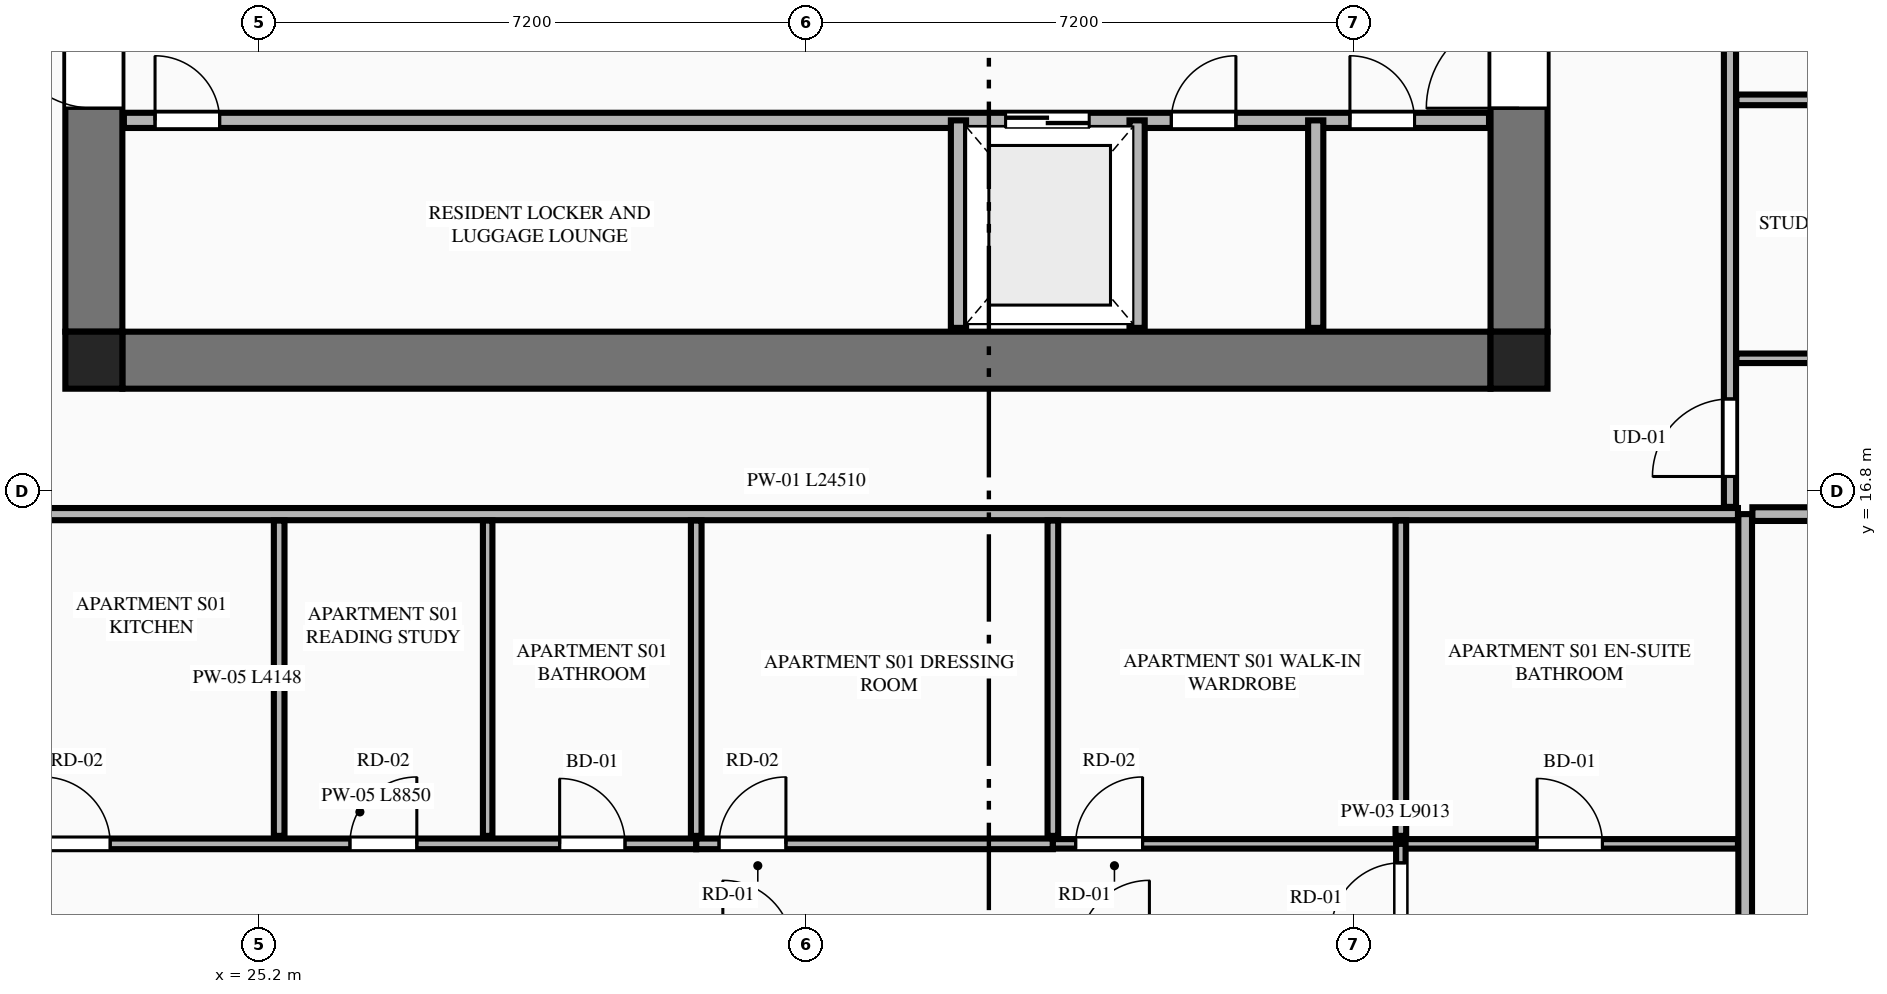
"""IFC4 building model, lengths in metres.
Left out: names, types, materials, properties, quantities, classifications, styles, units other than length and angle.
Written with IfcOpenShell. Run it as: python <this file> out.ifc"""

import sys

from ifc_helpers import new_model, si_unit, direction, frame, frame_2d, origin, origin_2d, place, context, subcontext, project, spatial, rectangle, extrude, element, fill, save


model = new_model("IFC4")
c1 = context("Model", 3, precision=1e-05, world=origin(), true_north=direction((0.0, 1.0)))
c2 = subcontext(c1, "Body", "Model", "MODEL_VIEW")
j1 = project(units=[si_unit("LENGTHUNIT", "METRE"), si_unit("PLANEANGLEUNIT", "RADIAN")], contexts=[c1])
p1 = place(None, origin())
s1 = spatial("IfcSite", under=j1, at=p1, CompositionType="ELEMENT")
p2 = place(p1, origin())
s2 = spatial("IfcBuilding", under=s1, at=p2, CompositionType="ELEMENT")
p3 = place(p2, frame((0.0, 0.0, 144.55)))
s3 = spatial("IfcBuildingStorey", under=s2, at=p3, CompositionType="ELEMENT", Elevation=144.55)
for number, where, z_axis, x_axis in (
    (1, (23.025, 18.525, 0.0), (0.0, 0.0, 1.0), (1.0, 0.0, 0.0)),
    (2, (41.775, 18.525, 0.0), (0.0, 0.0, 1.0), (1.0, 0.0, 0.0)),
):
    element("IfcColumn", number, at=place(p3, frame(where, z_axis=z_axis, x_axis=x_axis)), inside=s3, PredefinedType="COLUMN", context=c2, shape_type="SweptSolid", body=[
        extrude(rectangle(XDim=0.75, YDim=0.75, at=origin_2d()), origin(), (0.0, 0.0, 1.0), 3.55),
    ])
p4 = place(p3, frame((23.4, 18.525, 0.0), z_axis=(0.0, 0.0, 1.0), x_axis=(1.0, 0.0, 0.0)))
e3 = element("IfcWall", 3, at=p4, inside=s3, PredefinedType="SHEAR", context=c2, shape_type="SweptSolid", body=[
    extrude(rectangle(XDim=18.0, YDim=0.75, at=frame_2d((9.0, 0.0))), origin(), (0.0, 0.0, 1.0), 3.27),
])
p5 = place(p3, frame((23.025, 18.9, 0.0), z_axis=(0.0, 0.0, 1.0), x_axis=(0.0, 1.0, 0.0)))
e4 = element("IfcWall", 4, at=p5, inside=s3, PredefinedType="SHEAR", context=c2, shape_type="SweptSolid", body=[
    extrude(rectangle(XDim=14.0, YDim=0.75, at=frame_2d((7.0, 0.0))), origin(), (0.0, 0.0, 1.0), 3.27),
])
p6 = place(p5, frame((2.94, 0.0, 0.0)))
e5 = element("IfcOpeningElement", 5, at=p6, cuts=e4, PredefinedType="OPENING", context=c2, shape_type="SweptSolid", body=[
    extrude(rectangle(XDim=1.22, YDim=2.25, at=frame_2d((0.61, 1.125))), frame((0.0, 0.385, 0.0), z_axis=(0.0, -1.0, 0.0), x_axis=(1.0, 0.0, 0.0)), (0.0, 0.0, 1.0), 0.77),
])
p7 = place(p3, frame((41.775, 18.9, 0.0), z_axis=(0.0, 0.0, 1.0), x_axis=(0.0, 1.0, 0.0)))
e6 = element("IfcWall", 6, at=p7, inside=s3, PredefinedType="SHEAR", context=c2, shape_type="SweptSolid", body=[
    extrude(rectangle(XDim=14.0, YDim=0.75, at=frame_2d((7.0, 0.0))), origin(), (0.0, 0.0, 1.0), 3.27),
])
p8 = place(p7, frame((2.94, 0.0, 0.0)))
e7 = element("IfcOpeningElement", 7, at=p8, cuts=e6, PredefinedType="OPENING", context=c2, shape_type="SweptSolid", body=[
    extrude(rectangle(XDim=1.22, YDim=2.25, at=frame_2d((0.61, 1.125))), frame((0.0, 0.385, 0.0), z_axis=(0.0, -1.0, 0.0), x_axis=(1.0, 0.0, 0.0)), (0.0, 0.0, 1.0), 0.77),
])
p9 = place(p3, frame((23.42, 21.68, 0.0), z_axis=(0.0, 0.0, 1.0), x_axis=(1.0, 0.0, 0.0)))
e8 = element("IfcWall", 8, at=p9, inside=s3, PredefinedType="PLUMBINGWALL", context=c2, shape_type="SweptSolid", body=[
    extrude(rectangle(XDim=17.96, YDim=0.2, at=frame_2d((8.98, 0.0))), origin(), (0.0, 0.0, 1.0), 3.27),
])
p10 = place(p9, frame((11.6, 0.0, 0.0)))
e9 = element("IfcOpeningElement", 9, at=p10, cuts=e8, PredefinedType="OPENING", context=c2, shape_type="SweptSolid", body=[
    extrude(rectangle(XDim=1.1, YDim=2.2, at=frame_2d((0.55, 1.1))), frame((0.0, 0.11, 0.0), z_axis=(0.0, -1.0, 0.0), x_axis=(1.0, 0.0, 0.0)), (0.0, 0.0, 1.0), 0.22),
])
p11 = place(p9, frame((0.41, 0.0, 0.0)))
e10 = element("IfcOpeningElement", 10, at=p11, cuts=e8, PredefinedType="OPENING", context=c2, shape_type="SweptSolid", body=[
    extrude(rectangle(XDim=0.85, YDim=2.05, at=frame_2d((0.425, 1.025))), frame((0.0, 0.11, 0.0), z_axis=(0.0, -1.0, 0.0), x_axis=(1.0, 0.0, 0.0)), (0.0, 0.0, 1.0), 0.22),
])
p12 = place(p9, frame((13.78, 0.0, 0.0)))
e11 = element("IfcOpeningElement", 11, at=p12, cuts=e8, PredefinedType="OPENING", context=c2, shape_type="SweptSolid", body=[
    extrude(rectangle(XDim=0.85, YDim=2.05, at=frame_2d((0.425, 1.025))), frame((0.0, 0.11, 0.0), z_axis=(0.0, -1.0, 0.0), x_axis=(1.0, 0.0, 0.0)), (0.0, 0.0, 1.0), 0.22),
])
p13 = place(p9, frame((16.13, 0.0, 0.0)))
e12 = element("IfcOpeningElement", 12, at=p13, cuts=e8, PredefinedType="OPENING", context=c2, shape_type="SweptSolid", body=[
    extrude(rectangle(XDim=0.85, YDim=2.05, at=frame_2d((0.425, 1.025))), frame((0.0, 0.11, 0.0), z_axis=(0.0, -1.0, 0.0), x_axis=(1.0, 0.0, 0.0)), (0.0, 0.0, 1.0), 0.22),
])
for number, where, z_axis, x_axis in (
    (13, (34.4, 18.95, 0.0), (0.0, 0.0, 1.0), (0.0, 1.0, 0.0)),
    (14, (36.75, 18.95, 0.0), (0.0, 0.0, 1.0), (0.0, 1.0, 0.0)),
    (15, (39.1, 18.95, 0.0), (0.0, 0.0, 1.0), (0.0, 1.0, 0.0)),
):
    element("IfcWall", number, at=place(p3, frame(where, z_axis=z_axis, x_axis=x_axis)), inside=s3, PredefinedType="PLUMBINGWALL", context=c2, shape_type="SweptSolid", body=[
        extrude(rectangle(XDim=2.73, YDim=0.2, at=frame_2d((1.365, 0.0))), origin(), (0.0, 0.0, 1.0), 3.27),
    ])
p14 = place(p3, frame((44.75, 4.105, 0.0), z_axis=(0.0, 0.0, 1.0), x_axis=(0.0, 1.0, 0.0)))
e16 = element("IfcWall", 16, at=p14, inside=s3, PredefinedType="PARTITIONING", context=c2, shape_type="SweptSolid", body=[
    extrude(rectangle(XDim=12.395, YDim=0.18, at=frame_2d((6.198, 0.0))), origin(), (0.0, 0.0, 1.0), 3.27),
])
p15 = place(p3, frame((20.145, 16.5, 0.0), z_axis=(0.0, 0.0, 1.0), x_axis=(1.0, 0.0, 0.0)))
e17 = element("IfcWall", 17, at=p15, inside=s3, PredefinedType="PARTITIONING", context=c2, shape_type="SweptSolid", body=[
    extrude(rectangle(XDim=24.51, YDim=0.16, at=frame_2d((12.255, 0.0))), origin(), (0.0, 0.0, 1.0), 3.27),
])
p16 = place(p15, frame((0.405, 0.0, 0.0)))
e18 = element("IfcOpeningElement", 18, at=p16, cuts=e17, PredefinedType="OPENING", context=c2, shape_type="SweptSolid", body=[
    extrude(rectangle(XDim=1.35, YDim=2.35, at=frame_2d((0.675, 1.175))), frame((0.0, 0.09, 0.0), z_axis=(0.0, -1.0, 0.0), x_axis=(1.0, 0.0, 0.0)), (0.0, 0.0, 1.0), 0.18),
])
p17 = place(p3, frame((22.1, 12.162, 0.0), z_axis=(0.0, 0.0, 1.0), x_axis=(1.0, 0.0, 0.0)))
e19 = element("IfcWall", 19, at=p17, inside=s3, PredefinedType="PLUMBINGWALL", context=c2, shape_type="SweptSolid", body=[
    extrude(rectangle(XDim=8.85, YDim=0.14, at=frame_2d((4.425, 0.0))), origin(), (0.0, 0.0, 1.0), 3.27),
])
p18 = place(p17, frame((7.053, 0.0, 0.0)))
e20 = element("IfcOpeningElement", 20, at=p18, cuts=e19, PredefinedType="OPENING", context=c2, shape_type="SweptSolid", body=[
    extrude(rectangle(XDim=0.86, YDim=2.1, at=frame_2d((0.43, 1.05))), frame((0.0, 0.08, 0.0), z_axis=(0.0, -1.0, 0.0), x_axis=(1.0, 0.0, 0.0)), (0.0, 0.0, 1.0), 0.16),
])
p19 = place(p17, frame((0.26, 0.0, 0.0)))
e21 = element("IfcOpeningElement", 21, at=p19, cuts=e19, PredefinedType="OPENING", context=c2, shape_type="SweptSolid", body=[
    extrude(rectangle(XDim=0.88, YDim=2.15, at=frame_2d((0.44, 1.075))), frame((0.0, 0.08, 0.0), z_axis=(0.0, -1.0, 0.0), x_axis=(1.0, 0.0, 0.0)), (0.0, 0.0, 1.0), 0.16),
])
p20 = place(p17, frame((4.294, 0.0, 0.0)))
e22 = element("IfcOpeningElement", 22, at=p20, cuts=e19, PredefinedType="OPENING", context=c2, shape_type="SweptSolid", body=[
    extrude(rectangle(XDim=0.88, YDim=2.15, at=frame_2d((0.44, 1.075))), frame((0.0, 0.08, 0.0), z_axis=(0.0, -1.0, 0.0), x_axis=(1.0, 0.0, 0.0)), (0.0, 0.0, 1.0), 0.16),
])
p21 = place(p3, frame((30.95, 12.162, 0.0), z_axis=(0.0, 0.0, 1.0), x_axis=(1.0, 0.0, 0.0)))
e23 = element("IfcWall", 23, at=p21, inside=s3, PredefinedType="PLUMBINGWALL", context=c2, shape_type="SweptSolid", body=[
    extrude(rectangle(XDim=4.692, YDim=0.14, at=frame_2d((2.346, 0.0))), origin(), (0.0, 0.0, 1.0), 3.27),
])
p22 = place(p21, frame((0.3, 0.0, 0.0)))
e24 = element("IfcOpeningElement", 24, at=p22, cuts=e23, PredefinedType="OPENING", context=c2, shape_type="SweptSolid", body=[
    extrude(rectangle(XDim=0.88, YDim=2.15, at=frame_2d((0.44, 1.075))), frame((0.0, 0.08, 0.0), z_axis=(0.0, -1.0, 0.0), x_axis=(1.0, 0.0, 0.0)), (0.0, 0.0, 1.0), 0.16),
])
p23 = place(p3, frame((35.642, 12.162, 0.0), z_axis=(0.0, 0.0, 1.0), x_axis=(1.0, 0.0, 0.0)))
e25 = element("IfcWall", 25, at=p23, inside=s3, PredefinedType="PARTITIONING", context=c2, shape_type="SweptSolid", body=[
    extrude(rectangle(XDim=9.013, YDim=0.125, at=frame_2d((4.506, 0.0))), origin(), (0.0, 0.0, 1.0), 3.27),
])
p24 = place(p23, frame((6.37, 0.0, 0.0)))
e26 = element("IfcOpeningElement", 26, at=p24, cuts=e25, PredefinedType="OPENING", context=c2, shape_type="SweptSolid", body=[
    extrude(rectangle(XDim=0.86, YDim=2.1, at=frame_2d((0.43, 1.05))), frame((0.0, 0.073, 0.0), z_axis=(0.0, -1.0, 0.0), x_axis=(1.0, 0.0, 0.0)), (0.0, 0.0, 1.0), 0.145),
])
p25 = place(p23, frame((0.3, 0.0, 0.0)))
e27 = element("IfcOpeningElement", 27, at=p25, cuts=e25, PredefinedType="OPENING", context=c2, shape_type="SweptSolid", body=[
    extrude(rectangle(XDim=0.88, YDim=2.15, at=frame_2d((0.44, 1.075))), frame((0.0, 0.073, 0.0), z_axis=(0.0, -1.0, 0.0), x_axis=(1.0, 0.0, 0.0)), (0.0, 0.0, 1.0), 0.145),
])
p26 = place(p3, frame((25.463, 12.267, 0.0), z_axis=(0.0, 0.0, 1.0), x_axis=(0.0, 1.0, 0.0)))
e28 = element("IfcWall", 28, at=p26, inside=s3, PredefinedType="PLUMBINGWALL", context=c2, shape_type="SweptSolid", body=[
    extrude(rectangle(XDim=4.148, YDim=0.14, at=frame_2d((2.074, 0.0))), origin(), (0.0, 0.0, 1.0), 3.27),
])
p27 = place(p3, frame((28.206, 12.267, 0.0), z_axis=(0.0, 0.0, 1.0), x_axis=(0.0, 1.0, 0.0)))
e29 = element("IfcWall", 29, at=p27, inside=s3, PredefinedType="PARTITIONING", context=c2, shape_type="SweptSolid", body=[
    extrude(rectangle(XDim=4.148, YDim=0.125, at=frame_2d((2.074, 0.0))), origin(), (0.0, 0.0, 1.0), 3.27),
])
p28 = place(p3, frame((40.22, 10.832, 0.0), z_axis=(0.0, 0.0, 1.0), x_axis=(0.0, 1.0, 0.0)))
e30 = element("IfcWall", 30, at=p28, inside=s3, PredefinedType="PARTITIONING", context=c2, shape_type="SweptSolid", body=[
    extrude(rectangle(XDim=1.33, YDim=0.125, at=frame_2d((0.665, 0.0))), origin(), (0.0, 0.0, 1.0), 3.27),
])
p29 = place(p28, frame((0.16, 0.0, 0.0)))
e31 = element("IfcOpeningElement", 31, at=p29, cuts=e30, PredefinedType="OPENING", context=c2, shape_type="SweptSolid", body=[
    extrude(rectangle(XDim=0.92, YDim=2.15, at=frame_2d((0.46, 1.075))), frame((0.0, 0.073, 0.0), z_axis=(0.0, -1.0, 0.0), x_axis=(1.0, 0.0, 0.0)), (0.0, 0.0, 1.0), 0.145),
])
for number, where, z_axis, x_axis in (
    (32, (30.95, 12.267, 0.0), (0.0, 0.0, 1.0), (0.0, 1.0, 0.0)),
    (33, (35.642, 12.267, 0.0), (0.0, 0.0, 1.0), (0.0, 1.0, 0.0)),
    (34, (40.22, 12.267, 0.0), (0.0, 0.0, 1.0), (0.0, 1.0, 0.0)),
):
    element("IfcWall", number, at=place(p3, frame(where, z_axis=z_axis, x_axis=x_axis)), inside=s3, PredefinedType="PLUMBINGWALL", context=c2, shape_type="SweptSolid", body=[
        extrude(rectangle(XDim=4.148, YDim=0.14, at=frame_2d((2.074, 0.0))), origin(), (0.0, 0.0, 1.0), 3.27),
    ])
p30 = place(p3, frame((44.845, 16.5, 0.0), z_axis=(0.0, 0.0, 1.0), x_axis=(1.0, 0.0, 0.0)))
e35 = element("IfcWall", 35, at=p30, inside=s3, PredefinedType="PARTITIONING", context=c2, shape_type="SweptSolid", body=[
    extrude(rectangle(XDim=7.77, YDim=0.18, at=frame_2d((3.885, 0.0))), origin(), (0.0, 0.0, 1.0), 3.27),
])
p31 = place(p3, frame((44.55, 16.595, 0.0), z_axis=(0.0, 0.0, 1.0), x_axis=(0.0, 1.0, 0.0)))
e36 = element("IfcWall", 36, at=p31, inside=s3, PredefinedType="PARTITIONING", context=c2, shape_type="SweptSolid", body=[
    extrude(rectangle(XDim=10.714, YDim=0.16, at=frame_2d((5.357, 0.0))), origin(), (0.0, 0.0, 1.0), 3.27),
])
p32 = place(p31, frame((0.4, 0.0, 0.0)))
e37 = element("IfcOpeningElement", 37, at=p32, cuts=e36, PredefinedType="OPENING", context=c2, shape_type="SweptSolid", body=[
    extrude(rectangle(XDim=1.02, YDim=2.25, at=frame_2d((0.51, 1.125))), frame((0.0, 0.09, 0.0), z_axis=(0.0, -1.0, 0.0), x_axis=(1.0, 0.0, 0.0)), (0.0, 0.0, 1.0), 0.18),
])
p33 = place(p3, frame((44.635, 18.55, 0.0), z_axis=(0.0, 0.0, 1.0), x_axis=(1.0, 0.0, 0.0)))
e38 = element("IfcWall", 38, at=p33, inside=s3, PredefinedType="PARTITIONING", context=c2, shape_type="SweptSolid", body=[
    extrude(rectangle(XDim=3.48, YDim=0.125, at=frame_2d((1.74, 0.0))), origin(), (0.0, 0.0, 1.0), 2.652),
])
p34 = place(p3, frame((44.635, 21.95, 0.0), z_axis=(0.0, 0.0, 1.0), x_axis=(1.0, 0.0, 0.0)))
e39 = element("IfcWall", 39, at=p34, inside=s3, PredefinedType="PLUMBINGWALL", context=c2, shape_type="SweptSolid", body=[
    extrude(rectangle(XDim=3.48, YDim=0.14, at=frame_2d((1.74, 0.0))), origin(), (0.0, 0.0, 1.0), 3.27),
])
p35 = place(p6, origin())
e40 = element("IfcDoor", 40, at=p35, inside=s3, OperationType="SINGLE_SWING_RIGHT", PredefinedType="DOOR", context=c2, shape_type="SweptSolid", body=[
    extrude(rectangle(XDim=1.22, YDim=2.25, at=frame_2d((0.61, 1.125))), frame((0.0, 0.025, 0.0), z_axis=(0.0, -1.0, 0.0), x_axis=(1.0, 0.0, 0.0)), (0.0, 0.0, 1.0), 0.05),
])
fill(e5, e40)
p36 = place(p8, origin())
e41 = element("IfcDoor", 41, at=p36, inside=s3, OperationType="SINGLE_SWING_LEFT", PredefinedType="DOOR", context=c2, shape_type="SweptSolid", body=[
    extrude(rectangle(XDim=1.22, YDim=2.25, at=frame_2d((0.61, 1.125))), frame((0.0, 0.025, 0.0), z_axis=(0.0, -1.0, 0.0), x_axis=(1.0, 0.0, 0.0)), (0.0, 0.0, 1.0), 0.05),
])
fill(e7, e41)
p37 = place(p10, origin())
e42 = element("IfcDoor", 42, at=p37, inside=s3, OperationType="DOUBLE_DOOR_SLIDING", PredefinedType="DOOR", context=c2, shape_type="SweptSolid", body=[
    extrude(rectangle(XDim=1.1, YDim=2.2, at=frame_2d((0.55, 1.1))), frame((0.0, 0.025, 0.0), z_axis=(0.0, -1.0, 0.0), x_axis=(1.0, 0.0, 0.0)), (0.0, 0.0, 1.0), 0.05),
])
fill(e9, e42)
p38 = place(p11, origin())
e43 = element("IfcDoor", 43, at=p38, inside=s3, OperationType="SINGLE_SWING_LEFT", PredefinedType="DOOR", context=c2, shape_type="SweptSolid", body=[
    extrude(rectangle(XDim=0.85, YDim=2.05, at=frame_2d((0.425, 1.025))), frame((0.0, 0.025, 0.0), z_axis=(0.0, -1.0, 0.0), x_axis=(1.0, 0.0, 0.0)), (0.0, 0.0, 1.0), 0.05),
])
fill(e10, e43)
p39 = place(p12, origin())
e44 = element("IfcDoor", 44, at=p39, inside=s3, OperationType="SINGLE_SWING_RIGHT", PredefinedType="DOOR", context=c2, shape_type="SweptSolid", body=[
    extrude(rectangle(XDim=0.85, YDim=2.05, at=frame_2d((0.425, 1.025))), frame((0.0, 0.025, 0.0), z_axis=(0.0, -1.0, 0.0), x_axis=(1.0, 0.0, 0.0)), (0.0, 0.0, 1.0), 0.05),
])
fill(e11, e44)
p40 = place(p13, origin())
e45 = element("IfcDoor", 45, at=p40, inside=s3, OperationType="SINGLE_SWING_LEFT", PredefinedType="DOOR", context=c2, shape_type="SweptSolid", body=[
    extrude(rectangle(XDim=0.85, YDim=2.05, at=frame_2d((0.425, 1.025))), frame((0.0, 0.025, 0.0), z_axis=(0.0, -1.0, 0.0), x_axis=(1.0, 0.0, 0.0)), (0.0, 0.0, 1.0), 0.05),
])
fill(e12, e45)
p41 = place(p18, origin())
e46 = element("IfcDoor", 46, at=p41, inside=s3, OperationType="SINGLE_SWING_LEFT", PredefinedType="DOOR", context=c2, shape_type="SweptSolid", body=[
    extrude(rectangle(XDim=0.86, YDim=2.1, at=frame_2d((0.43, 1.05))), frame((0.0, 0.025, 0.0), z_axis=(0.0, -1.0, 0.0), x_axis=(1.0, 0.0, 0.0)), (0.0, 0.0, 1.0), 0.05),
])
fill(e20, e46)
p42 = place(p24, origin())
e47 = element("IfcDoor", 47, at=p42, inside=s3, OperationType="SINGLE_SWING_LEFT", PredefinedType="DOOR", context=c2, shape_type="SweptSolid", body=[
    extrude(rectangle(XDim=0.86, YDim=2.1, at=frame_2d((0.43, 1.05))), frame((0.0, 0.025, 0.0), z_axis=(0.0, -1.0, 0.0), x_axis=(1.0, 0.0, 0.0)), (0.0, 0.0, 1.0), 0.05),
])
fill(e26, e47)
p43 = place(p19, origin())
e48 = element("IfcDoor", 48, at=p43, inside=s3, OperationType="SINGLE_SWING_LEFT", PredefinedType="DOOR", context=c2, shape_type="SweptSolid", body=[
    extrude(rectangle(XDim=0.88, YDim=2.15, at=frame_2d((0.44, 1.075))), frame((0.0, 0.025, 0.0), z_axis=(0.0, -1.0, 0.0), x_axis=(1.0, 0.0, 0.0)), (0.0, 0.0, 1.0), 0.05),
])
fill(e21, e48)
p44 = place(p20, origin())
e49 = element("IfcDoor", 49, at=p44, inside=s3, OperationType="SINGLE_SWING_RIGHT", PredefinedType="DOOR", context=c2, shape_type="SweptSolid", body=[
    extrude(rectangle(XDim=0.88, YDim=2.15, at=frame_2d((0.44, 1.075))), frame((0.0, 0.025, 0.0), z_axis=(0.0, -1.0, 0.0), x_axis=(1.0, 0.0, 0.0)), (0.0, 0.0, 1.0), 0.05),
])
fill(e22, e49)
p45 = place(p22, origin())
e50 = element("IfcDoor", 50, at=p45, inside=s3, OperationType="SINGLE_SWING_RIGHT", PredefinedType="DOOR", context=c2, shape_type="SweptSolid", body=[
    extrude(rectangle(XDim=0.88, YDim=2.15, at=frame_2d((0.44, 1.075))), frame((0.0, 0.025, 0.0), z_axis=(0.0, -1.0, 0.0), x_axis=(1.0, 0.0, 0.0)), (0.0, 0.0, 1.0), 0.05),
])
fill(e24, e50)
p46 = place(p29, origin())
e51 = element("IfcDoor", 51, at=p46, inside=s3, OperationType="SINGLE_SWING_LEFT", PredefinedType="DOOR", context=c2, shape_type="SweptSolid", body=[
    extrude(rectangle(XDim=0.92, YDim=2.15, at=frame_2d((0.46, 1.075))), frame((0.0, 0.025, 0.0), z_axis=(0.0, -1.0, 0.0), x_axis=(1.0, 0.0, 0.0)), (0.0, 0.0, 1.0), 0.05),
])
fill(e31, e51)
p47 = place(p25, origin())
e52 = element("IfcDoor", 52, at=p47, inside=s3, OperationType="SINGLE_SWING_RIGHT", PredefinedType="DOOR", context=c2, shape_type="SweptSolid", body=[
    extrude(rectangle(XDim=0.88, YDim=2.15, at=frame_2d((0.44, 1.075))), frame((0.0, 0.025, 0.0), z_axis=(0.0, -1.0, 0.0), x_axis=(1.0, 0.0, 0.0)), (0.0, 0.0, 1.0), 0.05),
])
fill(e27, e52)
p48 = place(p32, origin())
e53 = element("IfcDoor", 53, at=p48, inside=s3, OperationType="SINGLE_SWING_LEFT", PredefinedType="DOOR", context=c2, shape_type="SweptSolid", body=[
    extrude(rectangle(XDim=1.02, YDim=2.25, at=frame_2d((0.51, 1.125))), frame((0.0, 0.025, 0.0), z_axis=(0.0, -1.0, 0.0), x_axis=(1.0, 0.0, 0.0)), (0.0, 0.0, 1.0), 0.05),
])
fill(e37, e53)
save(model, sys.argv[1])
